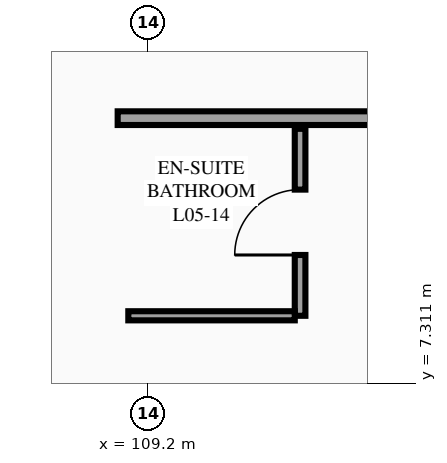
"""IFC4 building model, lengths in metres.
Left out: names, types, materials, properties, quantities, classifications, styles, units other than length and angle.
Written with IfcOpenShell. Run it as: python <this file> out.ifc"""

import sys

from ifc_helpers import new_model, si_unit, direction, frame, frame_2d, origin, place, context, subcontext, project, spatial, rectangle, extrude, element, fill, save


model = new_model("IFC4")
c1 = context("Model", 3, precision=1e-05, world=origin(), true_north=direction((0.0, 1.0)))
c2 = subcontext(c1, "Body", "Model", "MODEL_VIEW")
j1 = project(units=[si_unit("LENGTHUNIT", "METRE"), si_unit("PLANEANGLEUNIT", "RADIAN")], contexts=[c1])
p1 = place(None, origin())
s1 = spatial("IfcSite", under=j1, at=p1, CompositionType="ELEMENT")
p2 = place(p1, origin())
s2 = spatial("IfcBuilding", under=s1, at=p2, CompositionType="ELEMENT")
p3 = place(p2, frame((0.0, 0.0, 21.9)))
s3 = spatial("IfcBuildingStorey", under=s2, at=p3, CompositionType="ELEMENT", Elevation=21.9)
p4 = place(p3, frame((108.8, 10.8, 0.0), z_axis=(0.0, 0.0, 1.0), x_axis=(1.0, 0.0, 0.0)))
e1 = element("IfcWall", 1, at=p4, inside=s3, PredefinedType="PARTITIONING", context=c2, shape_type="SweptSolid", body=[
    extrude(rectangle(XDim=6.88, YDim=0.18, at=frame_2d((3.44, 0.0))), origin(), (0.0, 0.0, 1.0), 3.375),
])
p5 = place(p4, frame((4.653, 0.0, 0.0)))
e2 = element("IfcOpeningElement", 2, at=p5, cuts=e1, PredefinedType="OPENING", context=c2, shape_type="SweptSolid", body=[
    extrude(rectangle(XDim=0.96, YDim=2.15, at=frame_2d((0.48, 1.075))), frame((0.0, 0.1, 0.0), z_axis=(0.0, -1.0, 0.0), x_axis=(1.0, 0.0, 0.0)), (0.0, 0.0, 1.0), 0.2),
])
p6 = place(p3, frame((111.2, 8.2, 0.0), z_axis=(0.0, 0.0, 1.0), x_axis=(0.0, 1.0, 0.0)))
e3 = element("IfcWall", 3, at=p6, inside=s3, PredefinedType="PARTITIONING", context=c2, shape_type="SweptSolid", body=[
    extrude(rectangle(XDim=2.46, YDim=0.14, at=frame_2d((1.23, 0.0))), origin(), (0.0, 0.0, 1.0), 3.375),
])
p7 = place(p6, frame((0.8, 0.0, 0.0)))
e4 = element("IfcOpeningElement", 4, at=p7, cuts=e3, PredefinedType="OPENING", context=c2, shape_type="SweptSolid", body=[
    extrude(rectangle(XDim=0.86, YDim=2.1, at=frame_2d((0.43, 1.05))), frame((0.0, 0.08, 0.0), z_axis=(0.0, -1.0, 0.0), x_axis=(1.0, 0.0, 0.0)), (0.0, 0.0, 1.0), 0.16),
])
p8 = place(p3, frame((108.94, 8.2, 0.0), z_axis=(0.0, 0.0, 1.0), x_axis=(1.0, 0.0, 0.0)))
e5 = element("IfcWall", 5, at=p8, inside=s3, PredefinedType="PARTITIONING", context=c2, shape_type="SweptSolid", body=[
    extrude(rectangle(XDim=2.19, YDim=0.12, at=frame_2d((1.095, 0.0))), origin(), (0.0, 0.0, 1.0), 3.375),
])
p9 = place(p7, origin())
e6 = element("IfcDoor", 6, at=p9, inside=s3, OperationType="SINGLE_SWING_LEFT", PredefinedType="DOOR", context=c2, shape_type="SweptSolid", body=[
    extrude(rectangle(XDim=0.86, YDim=2.1, at=frame_2d((0.43, 1.05))), frame((0.0, 0.025, 0.0), z_axis=(0.0, -1.0, 0.0), x_axis=(1.0, 0.0, 0.0)), (0.0, 0.0, 1.0), 0.05),
])
fill(e4, e6)
save(model, sys.argv[1])
